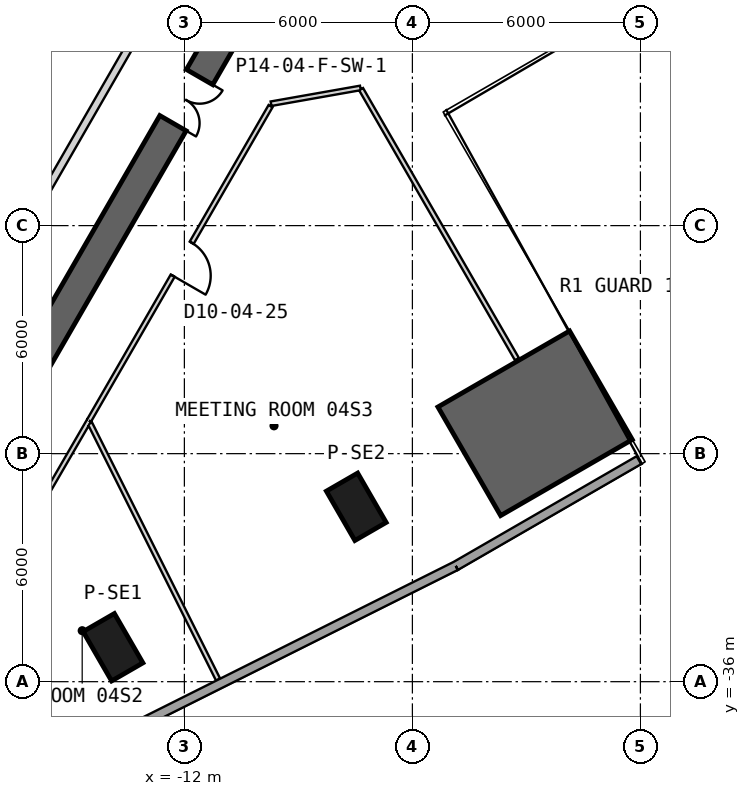
"""IFC4 building model, lengths in metres.
Left out: names, types, materials, properties, quantities, classifications, styles, units other than length and angle.
Written with IfcOpenShell. Run it as: python <this file> out.ifc"""

import sys

from ifc_helpers import new_model, si_unit, direction, frame, frame_2d, origin, origin_2d, place, context, subcontext, project, spatial, polyline, rectangle, outline, extrude, element, fill, save


model = new_model("IFC4")
c1 = context("Model", 3, precision=1e-05, world=origin(), true_north=direction((0.0, 1.0)))
c2 = subcontext(c1, "Body", "Model", "MODEL_VIEW")
j1 = project(units=[si_unit("LENGTHUNIT", "METRE"), si_unit("PLANEANGLEUNIT", "RADIAN")], contexts=[c1])
p1 = place(None, origin())
s1 = spatial("IfcSite", under=j1, at=p1, CompositionType="ELEMENT")
p2 = place(p1, origin())
s2 = spatial("IfcBuilding", under=s1, at=p2, CompositionType="ELEMENT")
p3 = place(p2, frame((0.0, 0.0, 27.5)))
s3 = spatial("IfcBuildingStorey", under=s2, at=p3, CompositionType="ELEMENT", Elevation=27.5)
for number, where, z_axis, x_axis in (
    (1, (-13.878, -35.094, 0.0), (0.0, 0.0, 1.0), (0.5, -0.866, 0.0)),
    (2, (-7.477, -31.398, 0.0), (0.0, 0.0, 1.0), (0.5, -0.866, 0.0)),
):
    element("IfcColumn", number, at=place(p3, frame(where, z_axis=z_axis, x_axis=x_axis)), inside=s3, PredefinedType="COLUMN", context=c2, shape_type="SweptSolid", body=[
        extrude(rectangle(XDim=1.5, YDim=0.95, at=origin_2d()), origin(), (0.0, 0.0, 1.0), 6.0),
    ])
p4 = place(p3, frame((-10.575, -18.316, 0.0), z_axis=(0.0, 0.0, 1.0), x_axis=(-0.499996575515, -0.866027380903, 0.0)))
e3 = element("IfcWall", 3, at=p4, inside=s3, PredefinedType="SHEAR", context=c2, shape_type="SweptSolid", body=[
    extrude(rectangle(XDim=13.954, YDim=0.8, at=frame_2d((6.977, 0.0))), origin(), (0.0, 0.0, 1.0), 6.0),
])
p5 = place(p4, frame((2.05, 0.0, 0.0)))
e4 = element("IfcOpeningElement", 4, at=p5, cuts=e3, PredefinedType="OPENING", context=c2, shape_type="SweptSolid", body=[
    extrude(rectangle(XDim=1.4, YDim=2.4, at=frame_2d((0.7, 1.2))), frame((0.0, 0.41, 0.0), z_axis=(0.0, -1.0, 0.0), x_axis=(1.0, 0.0, 0.0)), (0.0, 0.0, 1.0), 0.82),
])
p6 = place(p3, origin())
e5 = element("IfcWall", 5, at=p6, inside=s3, PredefinedType="SHEAR", context=c2, shape_type="SweptSolid", body=[
    extrude(outline(polyline([(-3.678, -31.63), (-0.214, -29.63), (-1.864, -26.772), (-5.328, -28.772), (-3.678, -31.63)])), origin(), (0.0, 0.0, 1.0), 6.0),
])
p7 = place(p3, frame((-17.203, -39.128, 0.0), z_axis=(0.0, 0.0, 1.0), x_axis=(0.894377655106, 0.447312653573, 0.0)))
e6 = element("IfcWall", 6, at=p7, inside=s3, PredefinedType="SOLIDWALL", context=c2, shape_type="SweptSolid", body=[
    extrude(rectangle(XDim=13.802, YDim=0.24, at=frame_2d((6.901, 0.0))), origin(), (0.0, 0.0, 1.0), 5.7),
])
p8 = place(p3, frame((-4.859, -32.954, 0.0), z_axis=(0.0, 0.0, 1.0), x_axis=(0.865999312459, 0.500045188778, 0.0)))
e7 = element("IfcWall", 7, at=p8, inside=s3, PredefinedType="SOLIDWALL", context=c2, shape_type="SweptSolid", body=[
    extrude(rectangle(XDim=5.566, YDim=0.24, at=frame_2d((2.783, 0.0))), origin(), (0.0, 0.0, 1.0), 5.7),
])
p9 = place(p3, frame((-23.881, -37.42, 0.0), z_axis=(0.0, 0.0, 1.0), x_axis=(0.498838330943, 0.866695055704, 0.0)))
e8 = element("IfcWall", 8, at=p9, inside=s3, PredefinedType="PARTITIONING", context=c2, shape_type="SweptSolid", body=[
    extrude(rectangle(XDim=21.545, YDim=0.2, at=frame_2d((10.772, 0.0))), origin(), (0.0, 0.0, 1.0), 5.7),
])
p10 = place(p9, frame((10.099, 0.0, 0.0)))
e9 = element("IfcOpeningElement", 9, at=p10, cuts=e8, PredefinedType="OPENING", context=c2, shape_type="SweptSolid", body=[
    extrude(rectangle(XDim=1.0, YDim=2.1, at=frame_2d((0.5, 1.05))), frame((0.0, 0.11, 0.0), z_axis=(0.0, -1.0, 0.0), x_axis=(1.0, 0.0, 0.0)), (0.0, 0.0, 1.0), 0.22),
])
p11 = place(p3, frame((-14.509, -29.13, 0.0), z_axis=(0.0, 0.0, 1.0), x_axis=(-0.502061062741, -0.864832174054, 0.0)))
e10 = element("IfcWall", 10, at=p11, inside=s3, PredefinedType="PARTITIONING", context=c2, shape_type="SweptSolid", body=[
    extrude(rectangle(XDim=11.866, YDim=0.12, at=frame_2d((5.933, 0.0))), origin(), (0.0, 0.0, 1.0), 5.7),
])
p12 = place(p11, frame((5.432, 0.0, 0.0)))
e11 = element("IfcOpeningElement", 11, at=p12, cuts=e10, PredefinedType="OPENING", context=c2, shape_type="SweptSolid", body=[
    extrude(rectangle(XDim=1.0, YDim=2.1, at=frame_2d((0.5, 1.05))), frame((0.0, 0.07, 0.0), z_axis=(0.0, -1.0, 0.0), x_axis=(1.0, 0.0, 0.0)), (0.0, 0.0, 1.0), 0.14),
])
p13 = place(p3, frame((-9.72, -20.792, 0.0), z_axis=(0.0, 0.0, 1.0), x_axis=(0.984776352386, 0.173826165409, 0.0)))
e12 = element("IfcWall", 12, at=p13, inside=s3, PredefinedType="PARTITIONING", context=c2, shape_type="SweptSolid", body=[
    extrude(rectangle(XDim=2.388, YDim=0.12, at=frame_2d((1.194, 0.0))), origin(), (0.0, 0.0, 1.0), 4.78),
])
p14 = place(p3, frame((-9.731, -20.855, 0.0), z_axis=(0.0, 0.0, 1.0), x_axis=(-0.500000422144, -0.866025160059, 0.0)))
e13 = element("IfcWall", 13, at=p14, inside=s3, PredefinedType="PARTITIONING", context=c2, shape_type="SweptSolid", body=[
    extrude(rectangle(XDim=9.554, YDim=0.12, at=frame_2d((4.777, 0.0))), origin(), (0.0, 0.0, 1.0), 5.7),
])
p15 = place(p14, frame((4.152, 0.0, 0.0)))
e14 = element("IfcOpeningElement", 14, at=p15, cuts=e13, PredefinedType="OPENING", context=c2, shape_type="SweptSolid", body=[
    extrude(rectangle(XDim=1.0, YDim=2.1, at=frame_2d((0.5, 1.05))), frame((0.0, 0.07, 0.0), z_axis=(0.0, -1.0, 0.0), x_axis=(1.0, 0.0, 0.0)), (0.0, 0.0, 1.0), 0.14),
])
p16 = place(p3, frame((-7.35, -20.409, 0.0), z_axis=(0.0, 0.0, 1.0), x_axis=(0.500015278874, -0.866016582343, 0.0)))
e15 = element("IfcWall", 15, at=p16, inside=s3, PredefinedType="PARTITIONING", context=c2, shape_type="SweptSolid", body=[
    extrude(rectangle(XDim=8.203, YDim=0.12, at=frame_2d((4.102, 0.0))), origin(), (0.0, 0.0, 1.0), 5.07),
])
p17 = place(p3, frame((-14.483, -29.206, 0.0), z_axis=(0.0, 0.0, 1.0), x_axis=(0.447291377977, -0.894388295533, 0.0)))
e16 = element("IfcWall", 16, at=p17, inside=s3, PredefinedType="PARTITIONING", context=c2, shape_type="SweptSolid", body=[
    extrude(rectangle(XDim=7.533, YDim=0.12, at=frame_2d((3.767, 0.0))), origin(), (0.0, 0.0, 1.0), 4.78),
])
p18 = place(p15, origin())
e17 = element("IfcDoor", 17, at=p18, inside=s3, OperationType="SINGLE_SWING_RIGHT", PredefinedType="NOTDEFINED", context=c2, shape_type="SweptSolid", body=[
    extrude(rectangle(XDim=1.0, YDim=2.1, at=frame_2d((0.5, 1.05))), frame((0.0, 0.025, 0.0), z_axis=(0.0, -1.0, 0.0), x_axis=(1.0, 0.0, 0.0)), (0.0, 0.0, 1.0), 0.05),
])
fill(e14, e17)
p19 = place(p5, origin())
e18 = element("IfcDoor", 18, at=p19, inside=s3, OperationType="DOUBLE_DOOR_SINGLE_SWING", PredefinedType="NOTDEFINED", context=c2, shape_type="SweptSolid", body=[
    extrude(rectangle(XDim=1.4, YDim=2.4, at=frame_2d((0.7, 1.2))), frame((0.0, 0.025, 0.0), z_axis=(0.0, -1.0, 0.0), x_axis=(1.0, 0.0, 0.0)), (0.0, 0.0, 1.0), 0.05),
])
fill(e4, e18)
save(model, sys.argv[1])
